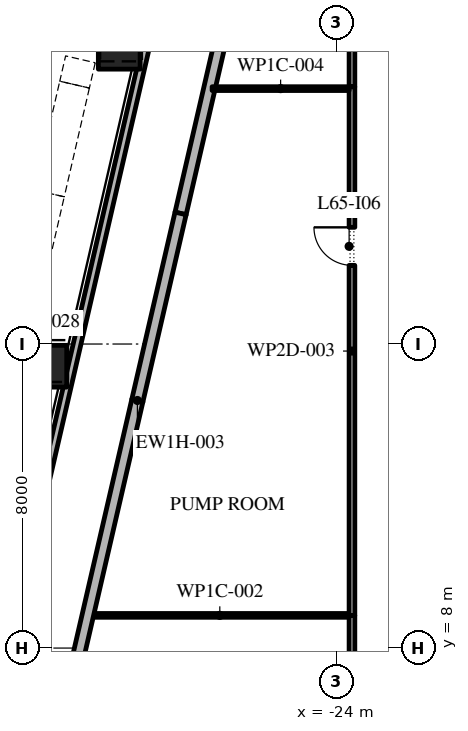
"""IFC4 building model, lengths in metres.
Left out: names, types, materials, properties, quantities, classifications, styles, units other than length and angle.
Written with IfcOpenShell. Run it as: python <this file> out.ifc"""

import sys

from ifc_helpers import new_model, si_unit, direction, frame, frame_2d, origin, origin_2d, place, context, subcontext, project, spatial, rectangle, extrude, element, fill, save


model = new_model("IFC4")
c1 = context("Model", 3, precision=1e-05, world=origin(), true_north=direction((0.0, 1.0)))
c2 = subcontext(c1, "Body", "Model", "MODEL_VIEW")
j1 = project(units=[si_unit("LENGTHUNIT", "METRE"), si_unit("PLANEANGLEUNIT", "RADIAN")], contexts=[c1])
p1 = place(None, origin())
s1 = spatial("IfcSite", under=j1, at=p1, CompositionType="ELEMENT")
p2 = place(p1, origin())
s2 = spatial("IfcBuilding", under=s1, at=p2, CompositionType="ELEMENT")
p3 = place(p2, frame((0.0, 0.0, 297.6)))
s3 = spatial("IfcBuildingStorey", under=s2, at=p3, CompositionType="ELEMENT", Elevation=297.6)
p4 = place(p3, frame((-29.723, 23.783, 0.0), z_axis=(0.00876448135, 0.03794930069, 0.999241229355), x_axis=(-0.974352081763, 0.225028933169, 0.0)))
e1 = element("IfcColumn", 1, at=p4, inside=s3, PredefinedType="COLUMN", context=c2, shape_type="SweptSolid", body=[
    extrude(rectangle(XDim=1.1, YDim=1.1, at=origin_2d()), origin(), (0.0, 0.0, 1.0), 5.404),
])
p5 = place(p3, frame((-31.655, 15.416, 0.0), z_axis=(0.005830386155, 0.025310203463, 0.999662643194), x_axis=(-0.974479105773, 0.22447822258, 0.0)))
e2 = element("IfcColumn", 2, at=p5, inside=s3, PredefinedType="COLUMN", context=c2, shape_type="SweptSolid", body=[
    extrude(rectangle(XDim=1.1, YDim=1.1, at=origin_2d()), origin(), (0.0, 0.0, 1.0), 5.402),
])
p6 = place(p3, frame((-21.359, 48.678, 0.0), z_axis=(0.0, 0.0, 1.0), x_axis=(-0.224949219336, -0.974370488428, 0.0)))
e3 = element("IfcWall", 3, at=p6, inside=s3, PredefinedType="STANDARD", context=c2, shape_type="SweptSolid", body=[
    extrude(rectangle(XDim=30.011, YDim=0.3, at=frame_2d((15.006, 0.0))), origin(), (0.0, 0.0, 1.0), 4.95),
])
p7 = place(p6, frame((1.607, 0.0, 0.6)))
e4 = element("IfcOpeningElement", 4, at=p7, cuts=e3, PredefinedType="OPENING", context=c2, shape_type="SweptSolid", body=[
    extrude(rectangle(XDim=3.6, YDim=3.9, at=frame_2d((1.8, 1.95))), frame((0.0, 0.16, 0.0), z_axis=(0.0, -1.0, 0.0), x_axis=(1.0, 0.0, 0.0)), (0.0, 0.0, 1.0), 0.32),
])
p8 = place(p6, frame((8.571, 0.0, 0.6)))
e5 = element("IfcOpeningElement", 5, at=p8, cuts=e3, PredefinedType="OPENING", context=c2, shape_type="SweptSolid", body=[
    extrude(rectangle(XDim=3.6, YDim=3.9, at=frame_2d((1.8, 1.95))), frame((0.0, 0.16, 0.0), z_axis=(0.0, -1.0, 0.0), x_axis=(1.0, 0.0, 0.0)), (0.0, 0.0, 1.0), 0.32),
])
p9 = place(p6, frame((15.686, 0.0, 0.6)))
e6 = element("IfcOpeningElement", 6, at=p9, cuts=e3, PredefinedType="OPENING", context=c2, shape_type="SweptSolid", body=[
    extrude(rectangle(XDim=3.6, YDim=3.9, at=frame_2d((1.8, 1.95))), frame((0.0, 0.16, 0.0), z_axis=(0.0, -1.0, 0.0), x_axis=(1.0, 0.0, 0.0)), (0.0, 0.0, 1.0), 0.32),
])
p10 = place(p3, frame((-21.517, 56.35, -0.05), z_axis=(0.0, 0.0, 1.0), x_axis=(-0.224951435492, -0.97436997679, 0.0)))
e7 = element("IfcWall", 7, at=p10, inside=s3, PredefinedType="STANDARD", context=c2, shape_type="SweptSolid", body=[
    extrude(rectangle(XDim=58.769, YDim=0.2, at=frame_2d((29.385, 0.0))), origin(), (0.0, 0.0, 1.0), 1.1),
])
p11 = place(p3, frame((-23.6, -4.275, 0.0), z_axis=(0.0, 0.0, 1.0), x_axis=(0.0, 1.0, 0.0)))
e8 = element("IfcWall", 8, at=p11, inside=s3, PredefinedType="PARTITIONING", context=c2, shape_type="SweptSolid", body=[
    extrude(rectangle(XDim=13.135, YDim=0.15, at=frame_2d((6.567, 0.0))), origin(), (0.0, 0.0, 1.0), 4.95),
])
p12 = place(p3, frame((-23.675, 8.86, 0.0), z_axis=(0.0, 0.0, 1.0), x_axis=(-1.0, 0.0, 0.0)))
e9 = element("IfcWall", 9, at=p12, inside=s3, PredefinedType="PARTITIONING", context=c2, shape_type="SweptSolid", body=[
    extrude(rectangle(XDim=6.805, YDim=0.1, at=frame_2d((3.402, 0.0))), origin(), (0.0, 0.0, 1.0), 4.95),
])
p13 = place(p3, frame((-23.6, 8.86, 0.0), z_axis=(0.0, 0.0, 1.0), x_axis=(0.0, 1.0, 0.0)))
e10 = element("IfcWall", 10, at=p13, inside=s3, PredefinedType="PARTITIONING", context=c2, shape_type="SweptSolid", body=[
    extrude(rectangle(XDim=13.91, YDim=0.15, at=frame_2d((6.955, 0.0))), origin(), (0.0, 0.0, 1.0), 4.95),
])
p14 = place(p13, frame((9.21, 0.0, 0.0)))
e11 = element("IfcOpeningElement", 11, at=p14, cuts=e10, PredefinedType="OPENING", context=c2, shape_type="SweptSolid", body=[
    extrude(rectangle(XDim=1.0, YDim=2.1, at=frame_2d((0.5, 1.05))), frame((0.0, 0.085, 0.0), z_axis=(0.0, -1.0, 0.0), x_axis=(1.0, 0.0, 0.0)), (0.0, 0.0, 1.0), 0.17),
])
p15 = place(p3, frame((-23.675, 22.72, 0.0), z_axis=(0.0, 0.0, 1.0), x_axis=(-1.0, 0.0, 0.0)))
e12 = element("IfcWall", 12, at=p15, inside=s3, PredefinedType="PARTITIONING", context=c2, shape_type="SweptSolid", body=[
    extrude(rectangle(XDim=3.605, YDim=0.1, at=frame_2d((1.802, 0.0))), origin(), (0.0, 0.0, 1.0), 4.95),
])
p16 = place(p3, frame((-23.6, 22.77, 0.0), z_axis=(0.0, 0.0, 1.0), x_axis=(0.0, 1.0, 0.0)))
e13 = element("IfcWall", 13, at=p16, inside=s3, PredefinedType="PARTITIONING", context=c2, shape_type="SweptSolid", body=[
    extrude(rectangle(XDim=12.305, YDim=0.15, at=frame_2d((6.152, 0.0))), origin(), (0.0, 0.0, 1.0), 4.95),
])
p17 = place(p16, frame((6.83, 0.0, 0.0)))
e14 = element("IfcOpeningElement", 14, at=p17, cuts=e13, PredefinedType="OPENING", context=c2, shape_type="SweptSolid", body=[
    extrude(rectangle(XDim=1.0, YDim=2.1, at=frame_2d((0.5, 1.05))), frame((0.0, 0.085, 0.0), z_axis=(0.0, -1.0, 0.0), x_axis=(1.0, 0.0, 0.0)), (0.0, 0.0, 1.0), 0.17),
])
p18 = place(p3, frame((-28.11, 19.436, 0.0), z_axis=(0.0, 0.0, 1.0), x_axis=(-0.22493716303, -0.974373271743, 0.0)))
e15 = element("IfcWall", 15, at=p18, inside=s3, PredefinedType="STANDARD", context=c2, shape_type="SweptSolid", body=[
    extrude(rectangle(XDim=5.051, YDim=0.3, at=frame_2d((2.526, 0.0))), origin(), (0.0, 0.0, 1.0), 4.05),
])
p19 = place(p3, frame((-29.246, 14.514, 0.0), z_axis=(0.0, 0.0, 1.0), x_axis=(-0.224953365503, -0.974369531209, 0.0)))
e16 = element("IfcWall", 16, at=p19, inside=s3, PredefinedType="STANDARD", context=c2, shape_type="SweptSolid", body=[
    extrude(rectangle(XDim=14.438, YDim=0.3, at=frame_2d((7.219, 0.0))), origin(), (0.0, 0.0, 1.0), 4.95),
])
p20 = place(p14, origin())
e17 = element("IfcDoor", 17, at=p20, inside=s3, OperationType="SINGLE_SWING_LEFT", PredefinedType="DOOR", context=c2, shape_type="SweptSolid", body=[
    extrude(rectangle(XDim=1.0, YDim=2.1, at=frame_2d((0.5, 1.05))), frame((0.0, 0.025, 0.0), z_axis=(0.0, -1.0, 0.0), x_axis=(1.0, 0.0, 0.0)), (0.0, 0.0, 1.0), 0.05),
])
fill(e11, e17)
save(model, sys.argv[1])
